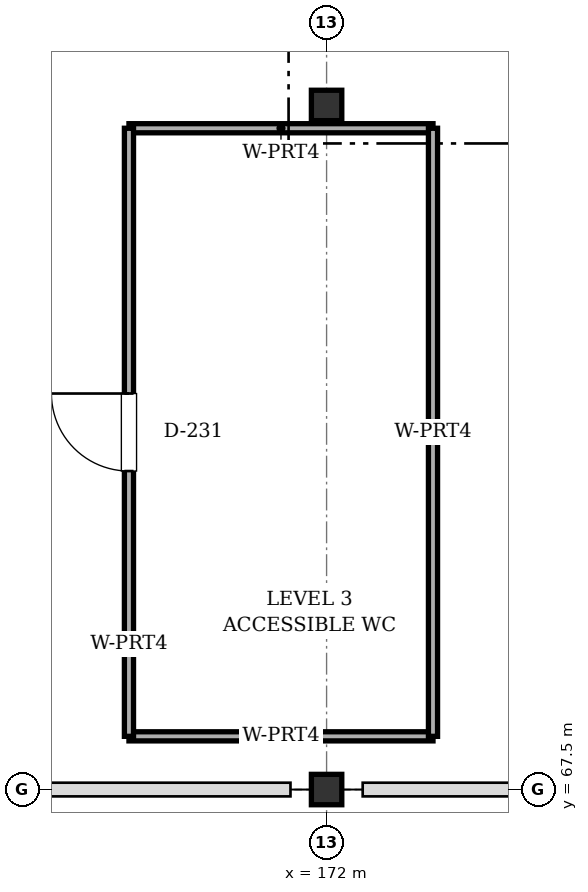
"""IFC4 building model, lengths in metres.
Left out: names, types, materials, properties, quantities, classifications, styles, units other than length and angle.
Written with IfcOpenShell. Run it as: python <this file> out.ifc"""

import sys

from ifc_helpers import new_model, si_unit, direction, frame, frame_2d, origin, origin_2d, place, context, subcontext, project, spatial, rectangle, i_section, extrude, element, fill, save


model = new_model("IFC4")
c1 = context("Model", 3, precision=1e-05, world=origin(), true_north=direction((0.0, 1.0)))
c2 = subcontext(c1, "Body", "Model", "MODEL_VIEW")
j1 = project(units=[si_unit("LENGTHUNIT", "METRE"), si_unit("PLANEANGLEUNIT", "RADIAN")], contexts=[c1])
p1 = place(None, origin())
s1 = spatial("IfcSite", under=j1, at=p1, CompositionType="ELEMENT")
p2 = place(p1, origin())
s2 = spatial("IfcBuilding", under=s1, at=p2, CompositionType="ELEMENT")
p3 = place(p2, frame((0.0, 0.0, 14.4)))
s3 = spatial("IfcBuildingStorey", under=s2, at=p3, CompositionType="ELEMENT", Elevation=14.4)
for number, where, z_axis, x_axis in (
    (1, (172.0, 67.5, 0.0), (0.0, 0.0, 1.0), (1.0, 0.0, 0.0)),
    (2, (172.0, 76.5, 0.0), (0.0, 0.0, 1.0), (1.0, 0.0, 0.0)),
):
    element("IfcColumn", number, at=place(p3, frame(where, z_axis=z_axis, x_axis=x_axis)), inside=s3, PredefinedType="COLUMN", context=c2, shape_type="SweptSolid", body=[
        extrude(i_section(OverallWidth=0.4, OverallDepth=0.4, WebThickness=0.013, FlangeThickness=0.021, FilletRadius=0.022, at=origin_2d()), origin(), (0.0, 0.0, 1.0), 3.2),
    ])
for number, where, z_axis, x_axis in (
    (3, (173.4, 68.2, 0.0), (0.0, 0.0, 1.0), (-1.0, 0.0, 0.0)),
    (4, (169.4, 76.2, 0.0), (0.0, 0.0, 1.0), (1.0, 0.0, 0.0)),
):
    element("IfcWall", number, at=place(p3, frame(where, z_axis=z_axis, x_axis=x_axis)), inside=s3, PredefinedType="PARTITIONING", context=c2, shape_type="SweptSolid", body=[
        extrude(rectangle(XDim=4.0, YDim=0.12, at=frame_2d((2.0, 0.0))), origin(), (0.0, 0.0, 1.0), 2.505),
    ])
p4 = place(p3, frame((169.4, 68.2, 0.0), z_axis=(0.0, 0.0, 1.0), x_axis=(0.0, 1.0, 0.0)))
e5 = element("IfcWall", 5, at=p4, inside=s3, PredefinedType="PARTITIONING", context=c2, shape_type="SweptSolid", body=[
    extrude(rectangle(XDim=8.0, YDim=0.12, at=frame_2d((4.0, 0.0))), origin(), (0.0, 0.0, 1.0), 2.505),
])
p5 = place(p4, frame((3.49, 0.0, 0.0)))
e6 = element("IfcOpeningElement", 6, at=p5, cuts=e5, PredefinedType="OPENING", context=c2, shape_type="SweptSolid", body=[
    extrude(rectangle(XDim=1.02, YDim=2.05, at=frame_2d((0.51, 1.025))), frame((0.0, 0.07, 0.0), z_axis=(0.0, -1.0, 0.0), x_axis=(1.0, 0.0, 0.0)), (0.0, 0.0, 1.0), 0.14),
])
p6 = place(p3, frame((173.4, 76.2, 0.0), z_axis=(0.0, 0.0, 1.0), x_axis=(0.0, -1.0, 0.0)))
e7 = element("IfcWall", 7, at=p6, inside=s3, PredefinedType="PARTITIONING", context=c2, shape_type="SweptSolid", body=[
    extrude(rectangle(XDim=8.0, YDim=0.12, at=frame_2d((4.0, 0.0))), origin(), (0.0, 0.0, 1.0), 2.505),
])
p7 = place(p5, origin())
e8 = element("IfcDoor", 8, at=p7, inside=s3, OperationType="SINGLE_SWING_RIGHT", PredefinedType="DOOR", context=c2, shape_type="SweptSolid", body=[
    extrude(rectangle(XDim=1.02, YDim=2.05, at=frame_2d((0.51, 1.025))), frame((0.0, 0.025, 0.0), z_axis=(0.0, -1.0, 0.0), x_axis=(1.0, 0.0, 0.0)), (0.0, 0.0, 1.0), 0.05),
])
fill(e6, e8)
save(model, sys.argv[1])
